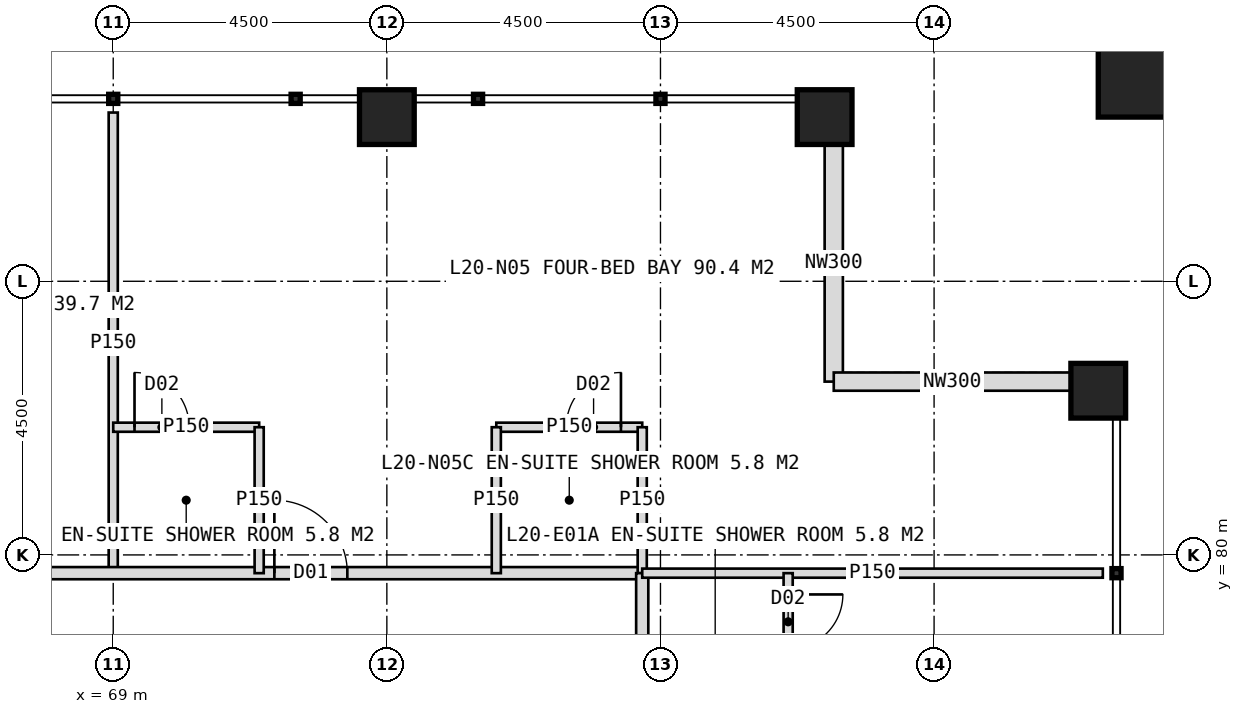
"""IFC4 building model, lengths in metres.
Left out: names, types, materials, properties, quantities, classifications, styles, units other than length and angle.
Written with IfcOpenShell. Run it as: python <this file> out.ifc"""

import sys

from ifc_helpers import new_model, si_unit, direction, frame, frame_2d, origin, origin_2d, place, context, subcontext, project, spatial, rectangle, hollow_rectangle, extrude, element, fill, save


model = new_model("IFC4")
c1 = context("Model", 3, precision=1e-05, world=origin(), true_north=direction((0.0, 1.0)))
c2 = subcontext(c1, "Body", "Model", "MODEL_VIEW")
j1 = project(units=[si_unit("LENGTHUNIT", "METRE"), si_unit("PLANEANGLEUNIT", "RADIAN")], contexts=[c1])
p1 = place(None, origin())
s1 = spatial("IfcSite", under=j1, at=p1, CompositionType="ELEMENT")
p2 = place(p1, origin())
s2 = spatial("IfcBuilding", under=s1, at=p2, CompositionType="ELEMENT")
p3 = place(p2, frame((0.0, 0.0, 87.0)))
s3 = spatial("IfcBuildingStorey", under=s2, at=p3, CompositionType="ELEMENT", Elevation=87.0)
for number, where, z_axis, x_axis in (
    (1, (73.5, 87.2, 0.0), (0.0, 0.0, 1.0), (1.0, 0.0, 0.0)),
    (2, (80.7, 87.2, 0.0), (0.0, 0.0, 1.0), (1.0, 0.0, 0.0)),
    (3, (85.2, 82.7, 0.0), (0.0, 0.0, 1.0), (1.0, 0.0, 0.0)),
):
    element("IfcColumn", number, at=place(p3, frame(where, z_axis=z_axis, x_axis=x_axis)), inside=s3, PredefinedType="COLUMN", context=c2, shape_type="SweptSolid", body=[
        extrude(hollow_rectangle(XDim=0.9, YDim=0.9, WallThickness=0.08, at=origin_2d()), origin(), (0.0, 0.0, 1.0), 4.0),
    ])
p4 = place(p3, frame((86.1, 88.1, 0.0), z_axis=(0.0, 0.0, 1.0), x_axis=(1.0, 0.0, 0.0)))
e4 = element("IfcColumn", 4, at=p4, inside=s3, PredefinedType="COLUMN", context=c2, shape_type="SweptSolid", body=[
    extrude(hollow_rectangle(XDim=1.8, YDim=1.8, WallThickness=0.1, at=origin_2d()), origin(), (0.0, 0.0, 1.0), 4.0),
])
for number, where, z_axis, x_axis in (
    (5, (80.85, 86.75, 0.0), (0.0, 0.0, 1.0), (0.0, -1.0, 0.0)),
    (6, (80.85, 82.85, 0.0), (0.0, 0.0, 1.0), (1.0, 0.0, 0.0)),
):
    element("IfcWall", number, at=place(p3, frame(where, z_axis=z_axis, x_axis=x_axis)), inside=s3, PredefinedType="ELEMENTEDWALL", context=c2, shape_type="SweptSolid", body=[
        extrude(rectangle(XDim=3.9, YDim=0.3, at=frame_2d((1.95, 0.0))), origin(), (0.0, 0.0, 1.0), 2.95),
    ])
p5 = place(p3, frame((69.0, 79.7, 0.0), z_axis=(0.0, 0.0, 1.0), x_axis=(0.0, 1.0, 0.0)))
e7 = element("IfcWall", 7, at=p5, inside=s3, PredefinedType="PARTITIONING", context=c2, shape_type="SweptSolid", body=[
    extrude(rectangle(XDim=7.575, YDim=0.15, at=frame_2d((3.788, 0.0))), origin(), (0.0, 0.0, 1.0), 3.75),
])
p6 = place(p3, frame((42.3, 79.7, 0.0), z_axis=(0.0, 0.0, 1.0), x_axis=(1.0, 0.0, 0.0)))
e8 = element("IfcWall", 8, at=p6, inside=s3, PredefinedType="PARTITIONING", context=c2, shape_type="SweptSolid", body=[
    extrude(rectangle(XDim=35.4, YDim=0.2, at=frame_2d((17.7, 0.0))), origin(), (0.0, 0.0, 1.0), 3.75),
])
p7 = place(p6, frame((2.65, 0.0, 0.0)))
e9 = element("IfcOpeningElement", 9, at=p7, cuts=e8, PredefinedType="OPENING", context=c2, shape_type="SweptSolid", body=[
    extrude(rectangle(XDim=1.2, YDim=2.2, at=frame_2d((0.6, 1.1))), frame((0.0, 0.11, 0.0), z_axis=(0.0, -1.0, 0.0), x_axis=(1.0, 0.0, 0.0)), (0.0, 0.0, 1.0), 0.22),
])
p8 = place(p6, frame((11.2, 0.0, 0.0)))
e10 = element("IfcOpeningElement", 10, at=p8, cuts=e8, PredefinedType="OPENING", context=c2, shape_type="SweptSolid", body=[
    extrude(rectangle(XDim=1.0, YDim=2.1, at=frame_2d((0.5, 1.05))), frame((0.0, 0.11, 0.0), z_axis=(0.0, -1.0, 0.0), x_axis=(1.0, 0.0, 0.0)), (0.0, 0.0, 1.0), 0.22),
])
p9 = place(p6, frame((17.2, 0.0, 0.0)))
e11 = element("IfcOpeningElement", 11, at=p9, cuts=e8, PredefinedType="OPENING", context=c2, shape_type="SweptSolid", body=[
    extrude(rectangle(XDim=1.0, YDim=2.1, at=frame_2d((0.5, 1.05))), frame((0.0, 0.11, 0.0), z_axis=(0.0, -1.0, 0.0), x_axis=(1.0, 0.0, 0.0)), (0.0, 0.0, 1.0), 0.22),
])
p10 = place(p6, frame((23.35, 0.0, 0.0)))
e12 = element("IfcOpeningElement", 12, at=p10, cuts=e8, PredefinedType="OPENING", context=c2, shape_type="SweptSolid", body=[
    extrude(rectangle(XDim=1.2, YDim=2.2, at=frame_2d((0.6, 1.1))), frame((0.0, 0.11, 0.0), z_axis=(0.0, -1.0, 0.0), x_axis=(1.0, 0.0, 0.0)), (0.0, 0.0, 1.0), 0.22),
])
p11 = place(p6, frame((29.35, 0.0, 0.0)))
e13 = element("IfcOpeningElement", 13, at=p11, cuts=e8, PredefinedType="OPENING", context=c2, shape_type="SweptSolid", body=[
    extrude(rectangle(XDim=1.2, YDim=2.2, at=frame_2d((0.6, 1.1))), frame((0.0, 0.11, 0.0), z_axis=(0.0, -1.0, 0.0), x_axis=(1.0, 0.0, 0.0)), (0.0, 0.0, 1.0), 0.22),
])
p12 = place(p3, frame((69.0, 82.1, 0.0), z_axis=(0.0, 0.0, 1.0), x_axis=(1.0, 0.0, 0.0)))
e14 = element("IfcWall", 14, at=p12, inside=s3, PredefinedType="PARTITIONING", context=c2, shape_type="SweptSolid", body=[
    extrude(rectangle(XDim=2.4, YDim=0.15, at=frame_2d((1.2, 0.0))), origin(), (0.0, 0.0, 1.0), 3.75),
])
p13 = place(p12, frame((0.35, 0.0, 0.0)))
e15 = element("IfcOpeningElement", 15, at=p13, cuts=e14, PredefinedType="OPENING", context=c2, shape_type="SweptSolid", body=[
    extrude(rectangle(XDim=0.9, YDim=2.1, at=frame_2d((0.45, 1.05))), frame((0.0, 0.085, 0.0), z_axis=(0.0, -1.0, 0.0), x_axis=(1.0, 0.0, 0.0)), (0.0, 0.0, 1.0), 0.17),
])
p14 = place(p3, frame((71.4, 79.7, 0.0), z_axis=(0.0, 0.0, 1.0), x_axis=(0.0, 1.0, 0.0)))
e16 = element("IfcWall", 16, at=p14, inside=s3, PredefinedType="PARTITIONING", context=c2, shape_type="SweptSolid", body=[
    extrude(rectangle(XDim=2.4, YDim=0.15, at=frame_2d((1.2, 0.0))), origin(), (0.0, 0.0, 1.0), 3.75),
])
p15 = place(p3, frame((75.3, 82.1, 0.0), z_axis=(0.0, 0.0, 1.0), x_axis=(1.0, 0.0, 0.0)))
e17 = element("IfcWall", 17, at=p15, inside=s3, PredefinedType="PARTITIONING", context=c2, shape_type="SweptSolid", body=[
    extrude(rectangle(XDim=2.4, YDim=0.15, at=frame_2d((1.2, 0.0))), origin(), (0.0, 0.0, 1.0), 3.75),
])
p16 = place(p15, frame((1.15, 0.0, 0.0)))
e18 = element("IfcOpeningElement", 18, at=p16, cuts=e17, PredefinedType="OPENING", context=c2, shape_type="SweptSolid", body=[
    extrude(rectangle(XDim=0.9, YDim=2.1, at=frame_2d((0.45, 1.05))), frame((0.0, 0.085, 0.0), z_axis=(0.0, -1.0, 0.0), x_axis=(1.0, 0.0, 0.0)), (0.0, 0.0, 1.0), 0.17),
])
for number, where, z_axis, x_axis in (
    (19, (75.3, 79.7, 0.0), (0.0, 0.0, 1.0), (0.0, 1.0, 0.0)),
    (20, (77.7, 79.7, 0.0), (0.0, 0.0, 1.0), (0.0, 1.0, 0.0)),
):
    element("IfcWall", number, at=place(p3, frame(where, z_axis=z_axis, x_axis=x_axis)), inside=s3, PredefinedType="PARTITIONING", context=c2, shape_type="SweptSolid", body=[
        extrude(rectangle(XDim=2.4, YDim=0.15, at=frame_2d((1.2, 0.0))), origin(), (0.0, 0.0, 1.0), 3.75),
    ])
p17 = place(p3, frame((77.7, 79.7, 0.0), z_axis=(0.0, 0.0, 1.0), x_axis=(0.0, -1.0, 0.0)))
e21 = element("IfcWall", 21, at=p17, inside=s3, PredefinedType="PARTITIONING", context=c2, shape_type="SweptSolid", body=[
    extrude(rectangle(XDim=35.4, YDim=0.2, at=frame_2d((17.7, 0.0))), origin(), (0.0, 0.0, 1.0), 3.75),
])
p18 = place(p17, frame((2.65, 0.0, 0.0)))
e22 = element("IfcOpeningElement", 22, at=p18, cuts=e21, PredefinedType="OPENING", context=c2, shape_type="SweptSolid", body=[
    extrude(rectangle(XDim=1.2, YDim=2.2, at=frame_2d((0.6, 1.1))), frame((0.0, 0.11, 0.0), z_axis=(0.0, -1.0, 0.0), x_axis=(1.0, 0.0, 0.0)), (0.0, 0.0, 1.0), 0.22),
])
p19 = place(p17, frame((8.35, 0.0, 0.0)))
e23 = element("IfcOpeningElement", 23, at=p19, cuts=e21, PredefinedType="OPENING", context=c2, shape_type="SweptSolid", body=[
    extrude(rectangle(XDim=1.2, YDim=2.2, at=frame_2d((0.6, 1.1))), frame((0.0, 0.11, 0.0), z_axis=(0.0, -1.0, 0.0), x_axis=(1.0, 0.0, 0.0)), (0.0, 0.0, 1.0), 0.22),
])
p20 = place(p17, frame((14.35, 0.0, 0.0)))
e24 = element("IfcOpeningElement", 24, at=p20, cuts=e21, PredefinedType="OPENING", context=c2, shape_type="SweptSolid", body=[
    extrude(rectangle(XDim=1.2, YDim=2.2, at=frame_2d((0.6, 1.1))), frame((0.0, 0.11, 0.0), z_axis=(0.0, -1.0, 0.0), x_axis=(1.0, 0.0, 0.0)), (0.0, 0.0, 1.0), 0.22),
])
p21 = place(p17, frame((20.35, 0.0, 0.0)))
e25 = element("IfcOpeningElement", 25, at=p21, cuts=e21, PredefinedType="OPENING", context=c2, shape_type="SweptSolid", body=[
    extrude(rectangle(XDim=1.2, YDim=2.2, at=frame_2d((0.6, 1.1))), frame((0.0, 0.11, 0.0), z_axis=(0.0, -1.0, 0.0), x_axis=(1.0, 0.0, 0.0)), (0.0, 0.0, 1.0), 0.22),
])
p22 = place(p17, frame((29.35, 0.0, 0.0)))
e26 = element("IfcOpeningElement", 26, at=p22, cuts=e21, PredefinedType="OPENING", context=c2, shape_type="SweptSolid", body=[
    extrude(rectangle(XDim=1.2, YDim=2.2, at=frame_2d((0.6, 1.1))), frame((0.0, 0.11, 0.0), z_axis=(0.0, -1.0, 0.0), x_axis=(1.0, 0.0, 0.0)), (0.0, 0.0, 1.0), 0.22),
])
p23 = place(p3, frame((77.7, 79.7, 0.0), z_axis=(0.0, 0.0, 1.0), x_axis=(1.0, 0.0, 0.0)))
e27 = element("IfcWall", 27, at=p23, inside=s3, PredefinedType="PARTITIONING", context=c2, shape_type="SweptSolid", body=[
    extrude(rectangle(XDim=7.575, YDim=0.15, at=frame_2d((3.788, 0.0))), origin(), (0.0, 0.0, 1.0), 3.75),
])
p24 = place(p3, frame((80.1, 79.7, 0.0), z_axis=(0.0, 0.0, 1.0), x_axis=(0.0, -1.0, 0.0)))
e28 = element("IfcWall", 28, at=p24, inside=s3, PredefinedType="PARTITIONING", context=c2, shape_type="SweptSolid", body=[
    extrude(rectangle(XDim=2.4, YDim=0.15, at=frame_2d((1.2, 0.0))), origin(), (0.0, 0.0, 1.0), 3.75),
])
p25 = place(p24, frame((0.35, 0.0, 0.0)))
e29 = element("IfcOpeningElement", 29, at=p25, cuts=e28, PredefinedType="OPENING", context=c2, shape_type="SweptSolid", body=[
    extrude(rectangle(XDim=0.9, YDim=2.1, at=frame_2d((0.45, 1.05))), frame((0.0, 0.085, 0.0), z_axis=(0.0, -1.0, 0.0), x_axis=(1.0, 0.0, 0.0)), (0.0, 0.0, 1.0), 0.17),
])
p26 = place(p11, origin())
e30 = element("IfcDoor", 30, at=p26, inside=s3, OperationType="SINGLE_SWING_LEFT", PredefinedType="DOOR", context=c2, shape_type="SweptSolid", body=[
    extrude(rectangle(XDim=1.2, YDim=2.2, at=frame_2d((0.6, 1.1))), frame((0.0, 0.025, 0.0), z_axis=(0.0, -1.0, 0.0), x_axis=(1.0, 0.0, 0.0)), (0.0, 0.0, 1.0), 0.05),
])
fill(e13, e30)
p27 = place(p13, origin())
e31 = element("IfcDoor", 31, at=p27, inside=s3, OperationType="SINGLE_SWING_LEFT", PredefinedType="DOOR", context=c2, shape_type="SweptSolid", body=[
    extrude(rectangle(XDim=0.9, YDim=2.1, at=frame_2d((0.45, 1.05))), frame((0.0, 0.025, 0.0), z_axis=(0.0, -1.0, 0.0), x_axis=(1.0, 0.0, 0.0)), (0.0, 0.0, 1.0), 0.05),
])
fill(e15, e31)
p28 = place(p16, origin())
e32 = element("IfcDoor", 32, at=p28, inside=s3, OperationType="SINGLE_SWING_RIGHT", PredefinedType="DOOR", context=c2, shape_type="SweptSolid", body=[
    extrude(rectangle(XDim=0.9, YDim=2.1, at=frame_2d((0.45, 1.05))), frame((0.0, 0.025, 0.0), z_axis=(0.0, -1.0, 0.0), x_axis=(1.0, 0.0, 0.0)), (0.0, 0.0, 1.0), 0.05),
])
fill(e18, e32)
p29 = place(p25, origin())
e33 = element("IfcDoor", 33, at=p29, inside=s3, OperationType="SINGLE_SWING_LEFT", PredefinedType="DOOR", context=c2, shape_type="SweptSolid", body=[
    extrude(rectangle(XDim=0.9, YDim=2.1, at=frame_2d((0.45, 1.05))), frame((0.0, 0.025, 0.0), z_axis=(0.0, -1.0, 0.0), x_axis=(1.0, 0.0, 0.0)), (0.0, 0.0, 1.0), 0.05),
])
fill(e29, e33)
save(model, sys.argv[1])
